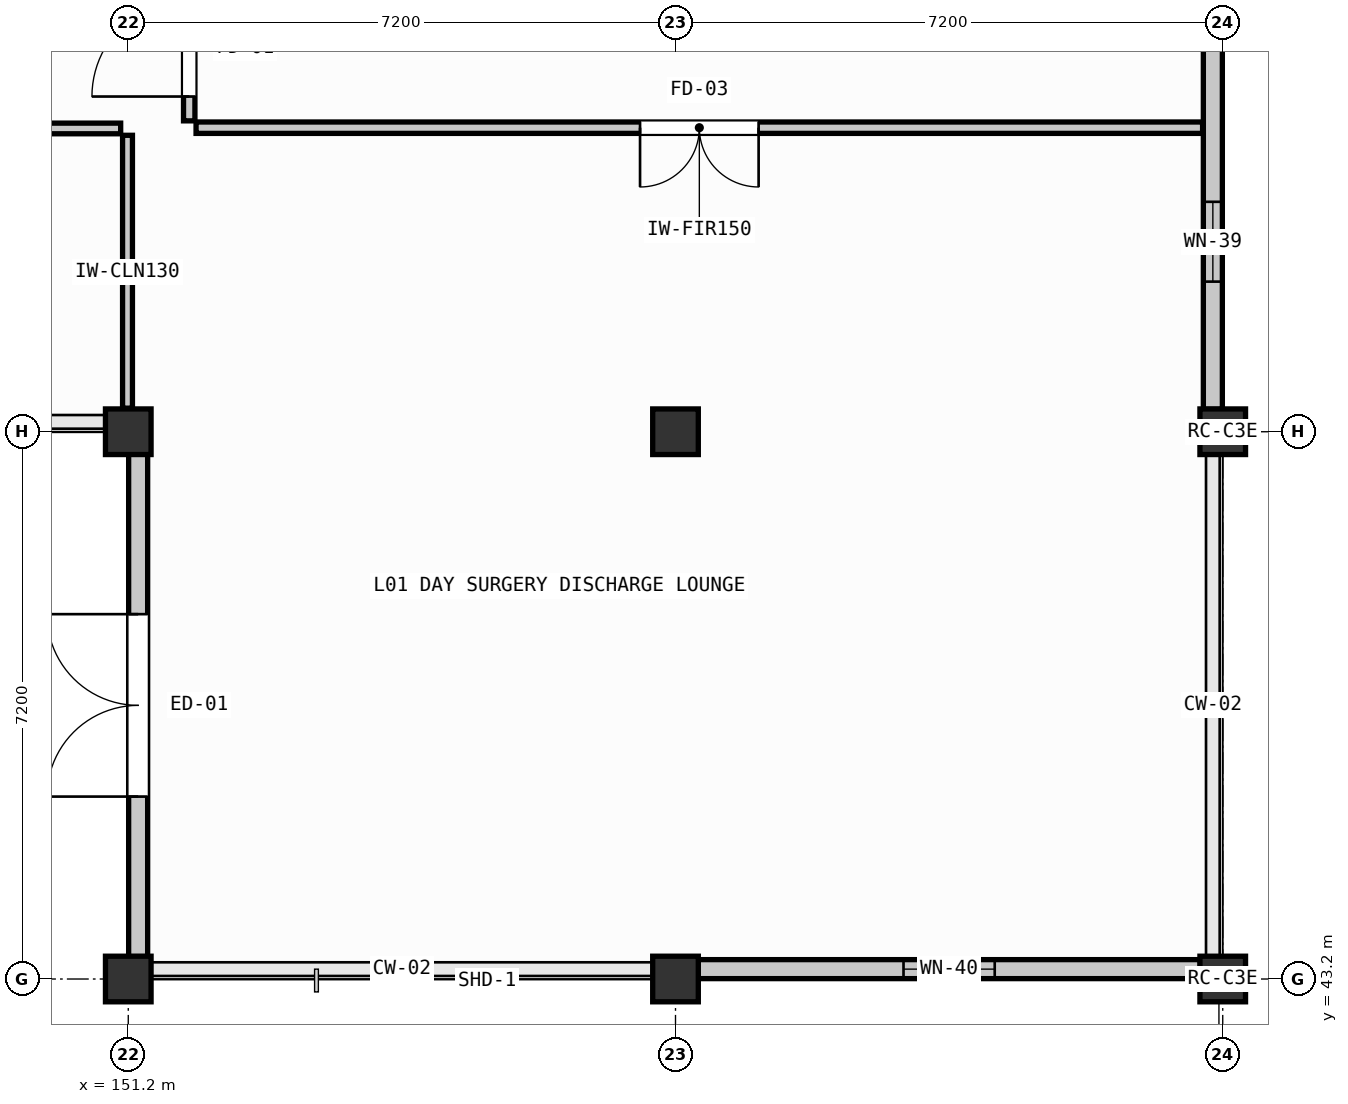
"""IFC4 building model, lengths in metres.
Left out: names, types, materials, properties, quantities, classifications, styles, units other than length and angle.
Written with IfcOpenShell. Run it as: python <this file> out.ifc"""

import sys

from ifc_helpers import new_model, si_unit, direction, frame, frame_2d, origin, origin_2d, place, context, subcontext, project, spatial, rectangle, extrude, element, fill, save


model = new_model("IFC4")
c1 = context("Model", 3, precision=1e-05, world=origin(), true_north=direction((0.0, 1.0)))
c2 = subcontext(c1, "Body", "Model", "MODEL_VIEW")
j1 = project(units=[si_unit("LENGTHUNIT", "METRE"), si_unit("PLANEANGLEUNIT", "RADIAN")], contexts=[c1])
p1 = place(None, origin())
s1 = spatial("IfcSite", under=j1, at=p1, CompositionType="ELEMENT")
p2 = place(p1, origin())
s2 = spatial("IfcBuilding", under=s1, at=p2, CompositionType="ELEMENT")
p3 = place(p2, origin())
s3 = spatial("IfcBuildingStorey", under=s2, at=p3, CompositionType="ELEMENT", Elevation=0.0)
for number, where, z_axis, x_axis in (
    (1, (151.2, 43.2, -0.25), (0.0, 0.0, 1.0), (1.0, 0.0, 0.0)),
    (2, (151.2, 50.4, -0.25), (0.0, 0.0, 1.0), (1.0, 0.0, 0.0)),
    (3, (158.4, 43.2, -0.25), (0.0, 0.0, 1.0), (1.0, 0.0, 0.0)),
    (4, (158.4, 50.4, -0.25), (0.0, 0.0, 1.0), (1.0, 0.0, 0.0)),
    (5, (165.6, 43.2, -0.25), (0.0, 0.0, 1.0), (1.0, 0.0, 0.0)),
    (6, (165.6, 50.4, -0.25), (0.0, 0.0, 1.0), (1.0, 0.0, 0.0)),
):
    element("IfcColumn", number, at=place(p3, frame(where, z_axis=z_axis, x_axis=x_axis)), inside=s3, PredefinedType="COLUMN", context=c2, shape_type="SweptSolid", body=[
        extrude(rectangle(XDim=0.6, YDim=0.6, at=origin_2d()), origin(), (0.0, 0.0, 1.0), 4.81),
    ])
p4 = place(p3, frame((165.47, 57.305, 0.0), z_axis=(0.0, 0.0, 1.0), x_axis=(0.0, -1.0, 0.0)))
e7 = element("IfcWall", 7, at=p4, inside=s3, PredefinedType="SOLIDWALL", context=c2, shape_type="SweptSolid", body=[
    extrude(rectangle(XDim=6.61, YDim=0.25, at=frame_2d((3.305, 0.0))), origin(), (0.0, 0.0, 1.0), 3.76),
])
p5 = place(p4, frame((3.88, 0.0, 0.95)))
e8 = element("IfcOpeningElement", 8, at=p5, cuts=e7, PredefinedType="OPENING", context=c2, shape_type="SweptSolid", body=[
    extrude(rectangle(XDim=1.05, YDim=1.55, at=frame_2d((0.525, 0.775))), frame((0.0, 0.135, 0.0), z_axis=(0.0, -1.0, 0.0), x_axis=(1.0, 0.0, 0.0)), (0.0, 0.0, 1.0), 0.27),
])
p6 = place(p3, frame((165.305, 43.33, 0.0), z_axis=(0.0, 0.0, 1.0), x_axis=(-1.0, 0.0, 0.0)))
e9 = element("IfcWall", 9, at=p6, inside=s3, PredefinedType="SOLIDWALL", context=c2, shape_type="SweptSolid", body=[
    extrude(rectangle(XDim=6.61, YDim=0.25, at=frame_2d((3.305, 0.0))), origin(), (0.0, 0.0, 1.0), 3.76),
])
p7 = place(p6, frame((2.705, 0.0, 0.95)))
e10 = element("IfcOpeningElement", 10, at=p7, cuts=e9, PredefinedType="OPENING", context=c2, shape_type="SweptSolid", body=[
    extrude(rectangle(XDim=1.2, YDim=1.55, at=frame_2d((0.6, 0.775))), frame((0.0, 0.135, 0.0), z_axis=(0.0, -1.0, 0.0), x_axis=(1.0, 0.0, 0.0)), (0.0, 0.0, 1.0), 0.27),
])
p8 = place(p3, frame((151.33, 43.495, 0.0), z_axis=(0.0, 0.0, 1.0), x_axis=(0.0, 1.0, 0.0)))
e11 = element("IfcWall", 11, at=p8, inside=s3, PredefinedType="SOLIDWALL", context=c2, shape_type="SweptSolid", body=[
    extrude(rectangle(XDim=6.61, YDim=0.25, at=frame_2d((3.305, 0.0))), origin(), (0.0, 0.0, 1.0), 3.76),
])
p9 = place(p8, frame((2.105, 0.0, 0.0)))
e12 = element("IfcOpeningElement", 12, at=p9, cuts=e11, PredefinedType="OPENING", context=c2, shape_type="SweptSolid", body=[
    extrude(rectangle(XDim=2.4, YDim=2.5, at=frame_2d((1.2, 1.25))), frame((0.0, 0.135, 0.0), z_axis=(0.0, -1.0, 0.0), x_axis=(1.0, 0.0, 0.0)), (0.0, 0.0, 1.0), 0.27),
])
p10 = place(p3, frame((165.335, 54.4, 0.0), z_axis=(0.0, 0.0, 1.0), x_axis=(-1.0, 0.0, 0.0)))
e13 = element("IfcWall", 13, at=p10, inside=s3, PredefinedType="PARTITIONING", context=c2, shape_type="SweptSolid", body=[
    extrude(rectangle(XDim=13.243, YDim=0.15, at=frame_2d((6.622, 0.0))), origin(), (0.0, 0.0, 1.0), 3.86),
])
p11 = place(p10, frame((5.842, 0.0, 0.0)))
e14 = element("IfcOpeningElement", 14, at=p11, cuts=e13, PredefinedType="OPENING", context=c2, shape_type="SweptSolid", body=[
    extrude(rectangle(XDim=1.56, YDim=2.22, at=frame_2d((0.78, 1.11))), frame((0.0, 0.085, 0.0), z_axis=(0.0, -1.0, 0.0), x_axis=(1.0, 0.0, 0.0)), (0.0, 0.0, 1.0), 0.17),
])
p12 = place(p3, frame((152.002, 54.49, 0.0), z_axis=(0.0, 0.0, 1.0), x_axis=(0.0, 1.0, 0.0)))
e15 = element("IfcWall", 15, at=p12, inside=s3, PredefinedType="PARTITIONING", context=c2, shape_type="SweptSolid", body=[
    extrude(rectangle(XDim=3.72, YDim=0.15, at=frame_2d((1.86, 0.0))), origin(), (0.0, 0.0, 1.0), 3.76),
])
p13 = place(p12, frame((0.32, 0.0, 0.0)))
e16 = element("IfcOpeningElement", 16, at=p13, cuts=e15, PredefinedType="OPENING", context=c2, shape_type="SweptSolid", body=[
    extrude(rectangle(XDim=1.28, YDim=2.18, at=frame_2d((0.64, 1.09))), frame((0.0, 0.085, 0.0), z_axis=(0.0, -1.0, 0.0), x_axis=(1.0, 0.0, 0.0)), (0.0, 0.0, 1.0), 0.17),
])
p14 = place(p3, frame((136.8, 54.39, 0.0), z_axis=(0.0, 0.0, 1.0), x_axis=(1.0, 0.0, 0.0)))
e17 = element("IfcWall", 17, at=p14, inside=s3, PredefinedType="PARTITIONING", context=c2, shape_type="SweptSolid", body=[
    extrude(rectangle(XDim=14.3, YDim=0.14, at=frame_2d((7.15, 0.0))), origin(), (0.0, 0.0, 1.0), 3.86),
])
p15 = place(p14, frame((6.68, 0.0, 0.0)))
e18 = element("IfcOpeningElement", 18, at=p15, cuts=e17, PredefinedType="OPENING", context=c2, shape_type="SweptSolid", body=[
    extrude(rectangle(XDim=0.94, YDim=2.1, at=frame_2d((0.47, 1.05))), frame((0.0, 0.08, 0.0), z_axis=(0.0, -1.0, 0.0), x_axis=(1.0, 0.0, 0.0)), (0.0, 0.0, 1.0), 0.16),
])
p16 = place(p3, frame((151.19, 54.3, 0.0), z_axis=(0.0, 0.0, 1.0), x_axis=(0.0, -1.0, 0.0)))
e19 = element("IfcWall", 19, at=p16, inside=s3, PredefinedType="PARTITIONING", context=c2, shape_type="SweptSolid", body=[
    extrude(rectangle(XDim=3.59, YDim=0.13, at=frame_2d((1.795, 0.0))), origin(), (0.0, 0.0, 1.0), 3.76),
])
p17 = place(p5, origin())
e20 = element("IfcWindow", 20, at=p17, inside=s3, PartitioningType="SINGLE_PANEL", PredefinedType="WINDOW", context=c2, shape_type="SweptSolid", body=[
    extrude(rectangle(XDim=1.05, YDim=1.55, at=frame_2d((0.525, 0.775))), frame((0.0, 0.03, 0.0), z_axis=(0.0, -1.0, 0.0), x_axis=(1.0, 0.0, 0.0)), (0.0, 0.0, 1.0), 0.06),
])
fill(e8, e20)
p18 = place(p7, origin())
e21 = element("IfcWindow", 21, at=p18, inside=s3, PartitioningType="SINGLE_PANEL", PredefinedType="WINDOW", context=c2, shape_type="SweptSolid", body=[
    extrude(rectangle(XDim=1.2, YDim=1.55, at=frame_2d((0.6, 0.775))), frame((0.0, 0.03, 0.0), z_axis=(0.0, -1.0, 0.0), x_axis=(1.0, 0.0, 0.0)), (0.0, 0.0, 1.0), 0.06),
])
fill(e10, e21)
p19 = place(p9, origin())
e22 = element("IfcDoor", 22, at=p19, inside=s3, OperationType="DOUBLE_DOOR_SINGLE_SWING", PredefinedType="DOOR", context=c2, shape_type="SweptSolid", body=[
    extrude(rectangle(XDim=2.4, YDim=2.5, at=frame_2d((1.2, 1.25))), frame((0.0, 0.025, 0.0), z_axis=(0.0, -1.0, 0.0), x_axis=(1.0, 0.0, 0.0)), (0.0, 0.0, 1.0), 0.05),
])
fill(e12, e22)
p20 = place(p13, origin())
e23 = element("IfcDoor", 23, at=p20, inside=s3, OperationType="SINGLE_SWING_LEFT", PredefinedType="DOOR", context=c2, shape_type="SweptSolid", body=[
    extrude(rectangle(XDim=1.28, YDim=2.18, at=frame_2d((0.64, 1.09))), frame((0.0, 0.025, 0.0), z_axis=(0.0, -1.0, 0.0), x_axis=(1.0, 0.0, 0.0)), (0.0, 0.0, 1.0), 0.05),
])
fill(e16, e23)
p21 = place(p11, origin())
e24 = element("IfcDoor", 24, at=p21, inside=s3, OperationType="DOUBLE_DOOR_SINGLE_SWING", PredefinedType="DOOR", context=c2, shape_type="SweptSolid", body=[
    extrude(rectangle(XDim=1.56, YDim=2.22, at=frame_2d((0.78, 1.11))), frame((0.0, 0.025, 0.0), z_axis=(0.0, -1.0, 0.0), x_axis=(1.0, 0.0, 0.0)), (0.0, 0.0, 1.0), 0.05),
])
fill(e14, e24)
save(model, sys.argv[1])
